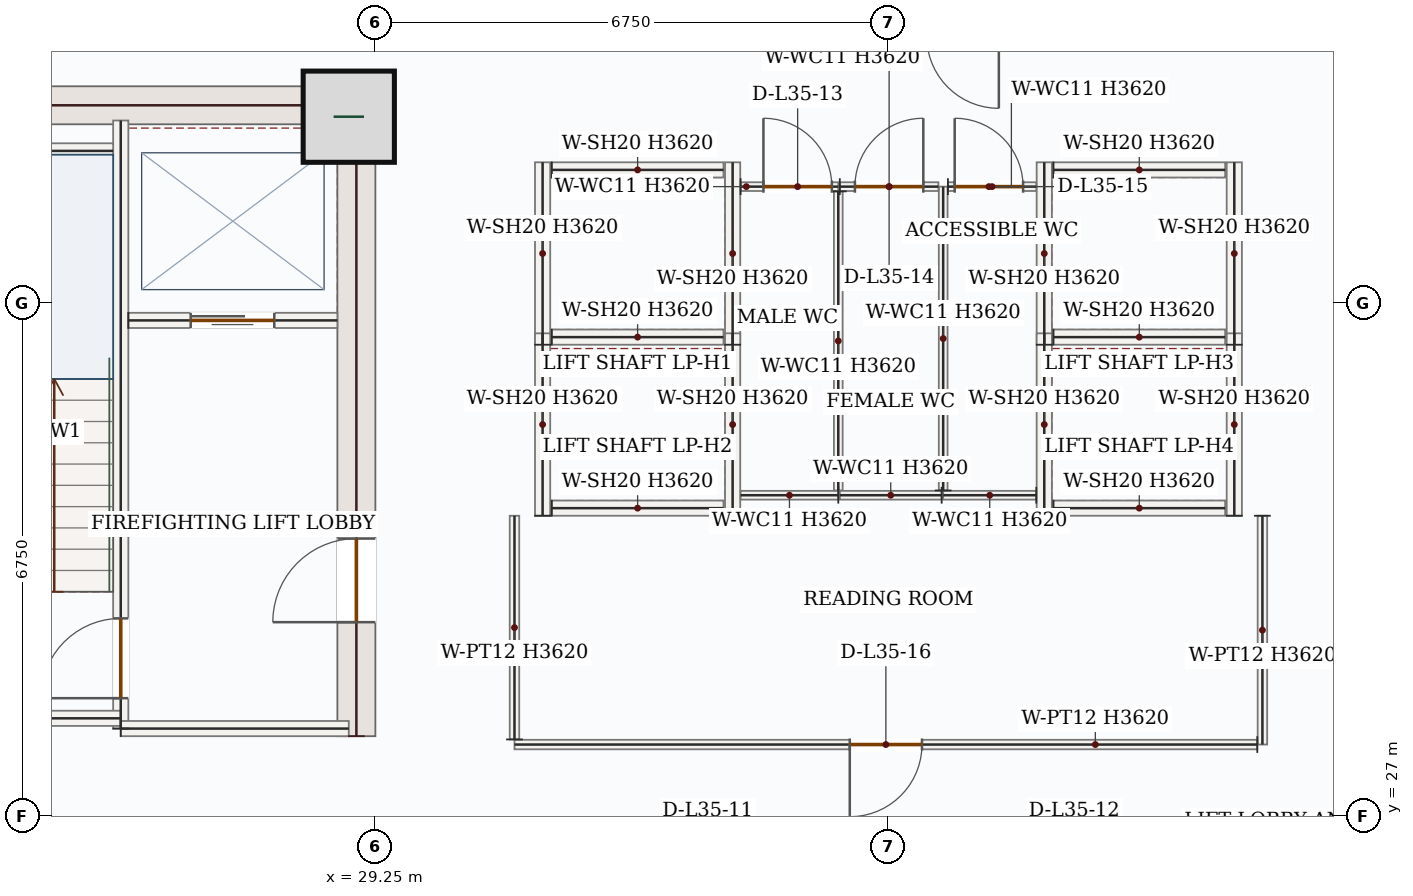
"""IFC4 building model, lengths in metres.
Left out: names, types, materials, properties, quantities, classifications, styles, units other than length and angle.
Written with IfcOpenShell. Run it as: python <this file> out.ifc"""

import sys

from ifc_helpers import new_model, si_unit, direction, frame, frame_2d, origin, origin_2d, place, context, subcontext, project, spatial, rectangle, extrude, source, transform, mapped, element, fill, save


model = new_model("IFC4")
c1 = context("Model", 3, precision=1e-05, world=origin(), true_north=direction((0.0, 1.0)))
c2 = subcontext(c1, "Body", "Model", "MODEL_VIEW")
j1 = project(units=[si_unit("LENGTHUNIT", "METRE"), si_unit("PLANEANGLEUNIT", "RADIAN")], contexts=[c1])
p1 = place(None, origin())
s1 = spatial("IfcSite", under=j1, at=p1, CompositionType="ELEMENT")
p2 = place(p1, origin())
s2 = spatial("IfcBuilding", under=s1, at=p2, CompositionType="ELEMENT")
p3 = place(p2, frame((0.0, 0.0, 155.1)))
s3 = spatial("IfcBuildingStorey", under=s2, at=p3, CompositionType="ELEMENT", Elevation=155.1)
p4 = place(p3, frame((29.0, 28.05, 0.0), z_axis=(0.0, 0.0, 1.0), x_axis=(0.0, 1.0, 0.0)))
e1 = element("IfcWall", 1, at=p4, inside=s3, PredefinedType="SHEAR", context=c2, shape_type="SweptSolid", body=[
    extrude(rectangle(XDim=8.55, YDim=0.5, at=frame_2d((4.275, 0.0))), origin(), (0.0, 0.0, 1.0), 3.62),
])
p5 = place(p4, frame((1.5, 0.0, 0.0)))
e2 = element("IfcOpeningElement", 2, at=p5, cuts=e1, PredefinedType="OPENING", context=c2, shape_type="SweptSolid", body=[
    extrude(rectangle(XDim=1.1, YDim=2.2, at=frame_2d((0.55, 1.1))), frame((0.0, 0.26, 0.0), z_axis=(0.0, -1.0, 0.0), x_axis=(1.0, 0.0, 0.0)), (0.0, 0.0, 1.0), 0.52),
])
m1 = source(origin(), c2, "Body", "SweptSolid", [
    extrude(rectangle(XDim=7.0, YDim=0.5, at=frame_2d((3.5, 0.0))), origin(), (0.0, 0.0, 1.0), 3.62),
])
p6 = place(p3, frame((21.75, 36.35, 0.0), z_axis=(0.0, 0.0, 1.0), x_axis=(1.0, 0.0, 0.0)))
e3 = element("IfcWall", 3, at=p6, inside=s3, PredefinedType="SHEAR", context=c2, shape_type="MappedRepresentation", body=[
    mapped(m1, transform((0.0, 0.0, 0.0), x_axis=(1.0, 0.0, 0.0), y_axis=(0.0, 1.0, 0.0), z_axis=(0.0, 0.0, 1.0), scale=1.0)),
])
m2 = source(origin(), c2, "Body", "SweptSolid", [
    extrude(rectangle(XDim=1.2, YDim=1.2, at=origin_2d()), origin(), (0.0, 0.0, 1.0), 3.9),
])
p7 = place(p3, frame((28.9, 36.2, 0.0), z_axis=(0.0, 0.0, 1.0), x_axis=(1.0, 0.0, 0.0)))
e4 = element("IfcColumn", 4, at=p7, inside=s3, PredefinedType="COLUMN", context=c2, shape_type="MappedRepresentation", body=[
    mapped(m2, transform((0.0, 0.0, 0.0), x_axis=(1.0, 0.0, 0.0), y_axis=(0.0, 1.0, 0.0), z_axis=(0.0, 0.0, 1.0), scale=1.0)),
])
p8 = place(p3, frame((25.9, 28.15, 0.0), z_axis=(0.0, 0.0, 1.0), x_axis=(0.0, 1.0, 0.0)))
e5 = element("IfcWall", 5, at=p8, inside=s3, PredefinedType="SOLIDWALL", context=c2, shape_type="SweptSolid", body=[
    extrude(rectangle(XDim=8.0, YDim=0.2, at=frame_2d((4.0, 0.0))), origin(), (0.0, 0.0, 1.0), 3.62),
])
p9 = place(p8, frame((0.4, 0.0, 0.0)))
e6 = element("IfcOpeningElement", 6, at=p9, cuts=e5, PredefinedType="OPENING", context=c2, shape_type="SweptSolid", body=[
    extrude(rectangle(XDim=1.05, YDim=2.15, at=frame_2d((0.525, 1.075))), frame((0.0, 0.11, 0.0), z_axis=(0.0, -1.0, 0.0), x_axis=(1.0, 0.0, 0.0)), (0.0, 0.0, 1.0), 0.22),
])
m3 = source(origin(), c2, "Body", "SweptSolid", [
    extrude(rectangle(XDim=4.25, YDim=0.2, at=frame_2d((2.125, 0.0))), origin(), (0.0, 0.0, 1.0), 3.62),
])
p10 = place(p3, frame((21.65, 28.285, 0.0), z_axis=(0.0, 0.0, 1.0), x_axis=(1.0, 0.0, 0.0)))
e7 = element("IfcWall", 7, at=p10, inside=s3, PredefinedType="SOLIDWALL", context=c2, shape_type="MappedRepresentation", body=[
    mapped(m3, transform((0.0, 0.0, 0.0), x_axis=(1.0, 0.0, 0.0), y_axis=(0.0, 1.0, 0.0), z_axis=(0.0, 0.0, 1.0), scale=1.0)),
])
m4 = source(origin(), c2, "Body", "SweptSolid", [
    extrude(rectangle(XDim=3.0, YDim=0.2, at=frame_2d((1.5, 0.0))), origin(), (0.0, 0.0, 1.0), 3.62),
])
p11 = place(p3, frame((25.9, 28.15, 0.0), z_axis=(0.0, 0.0, 1.0), x_axis=(1.0, 0.0, 0.0)))
e8 = element("IfcWall", 8, at=p11, inside=s3, PredefinedType="SOLIDWALL", context=c2, shape_type="MappedRepresentation", body=[
    mapped(m4, transform((0.0, 0.0, 0.0), x_axis=(1.0, 0.0, 0.0), y_axis=(0.0, 1.0, 0.0), z_axis=(0.0, 0.0, 1.0), scale=1.0)),
])
m5 = source(origin(), c2, "Body", "SweptSolid", [
    extrude(rectangle(XDim=3.25, YDim=0.2, at=frame_2d((1.625, 0.0))), origin(), (0.0, 0.0, 1.0), 3.62),
])
p12 = place(p3, frame((22.55, 35.75, 0.0), z_axis=(0.0, 0.0, 1.0), x_axis=(1.0, 0.0, 0.0)))
e9 = element("IfcWall", 9, at=p12, inside=s3, PredefinedType="SOLIDWALL", context=c2, shape_type="MappedRepresentation", body=[
    mapped(m5, transform((0.0, 0.0, 0.0), x_axis=(1.0, 0.0, 0.0), y_axis=(0.0, 1.0, 0.0), z_axis=(0.0, 0.0, 1.0), scale=1.0)),
])
p13 = place(p3, frame((26.0, 33.52, 0.0), z_axis=(0.0, 0.0, 1.0), x_axis=(1.0, 0.0, 0.0)))
e10 = element("IfcWall", 10, at=p13, inside=s3, PredefinedType="SOLIDWALL", context=c2, shape_type="SweptSolid", body=[
    extrude(rectangle(XDim=2.75, YDim=0.2, at=frame_2d((1.375, 0.0))), origin(), (0.0, 0.0, 1.0), 3.62),
])
p14 = place(p13, frame((0.82, 0.0, 0.0)))
e11 = element("IfcOpeningElement", 11, at=p14, cuts=e10, PredefinedType="OPENING", context=c2, shape_type="SweptSolid", body=[
    extrude(rectangle(XDim=1.1, YDim=2.15, at=frame_2d((0.55, 1.075))), frame((0.0, 0.11, 0.0), z_axis=(0.0, -1.0, 0.0), x_axis=(1.0, 0.0, 0.0)), (0.0, 0.0, 1.0), 0.22),
])
m6 = source(origin(), c2, "Body", "SweptSolid", [
    extrude(rectangle(XDim=2.4, YDim=0.2, at=frame_2d((1.2, 0.0))), origin(), (0.0, 0.0, 1.0), 3.62),
])
for number, where, z_axis, x_axis in (
    (12, (31.45, 33.2, 0.0), (0.0, 0.0, 1.0), (0.0, 1.0, 0.0)),
    (13, (33.95, 33.2, 0.0), (0.0, 0.0, 1.0), (0.0, 1.0, 0.0)),
):
    element("IfcWall", number, at=place(p3, frame(where, z_axis=z_axis, x_axis=x_axis)), inside=s3, PredefinedType="SOLIDWALL", context=c2, shape_type="MappedRepresentation", body=[
        mapped(m6, transform((0.0, 0.0, 0.0), x_axis=(1.0, 0.0, 0.0), y_axis=(0.0, 1.0, 0.0), z_axis=(0.0, 0.0, 1.0), scale=1.0)),
    ])
m7 = source(origin(), c2, "Body", "SweptSolid", [
    extrude(rectangle(XDim=2.26, YDim=0.2, at=frame_2d((1.13, 0.0))), origin(), (0.0, 0.0, 1.0), 3.62),
])
for number, where, z_axis, x_axis in (
    (14, (31.57, 33.3, 0.0), (0.0, 0.0, 1.0), (1.0, 0.0, 0.0)),
    (15, (31.57, 35.5, 0.0), (0.0, 0.0, 1.0), (1.0, 0.0, 0.0)),
):
    element("IfcWall", number, at=place(p3, frame(where, z_axis=z_axis, x_axis=x_axis)), inside=s3, PredefinedType="SOLIDWALL", context=c2, shape_type="MappedRepresentation", body=[
        mapped(m7, transform((0.0, 0.0, 0.0), x_axis=(1.0, 0.0, 0.0), y_axis=(0.0, 1.0, 0.0), z_axis=(0.0, 0.0, 1.0), scale=1.0)),
    ])
for number, where, z_axis, x_axis in (
    (16, (31.45, 30.95, 0.0), (0.0, 0.0, 1.0), (0.0, 1.0, 0.0)),
    (17, (33.95, 30.95, 0.0), (0.0, 0.0, 1.0), (0.0, 1.0, 0.0)),
):
    element("IfcWall", number, at=place(p3, frame(where, z_axis=z_axis, x_axis=x_axis)), inside=s3, PredefinedType="SOLIDWALL", context=c2, shape_type="MappedRepresentation", body=[
        mapped(m6, transform((0.0, 0.0, 0.0), x_axis=(1.0, 0.0, 0.0), y_axis=(0.0, 1.0, 0.0), z_axis=(0.0, 0.0, 1.0), scale=1.0)),
    ])
p15 = place(p3, frame((31.57, 31.05, 0.0), z_axis=(0.0, 0.0, 1.0), x_axis=(1.0, 0.0, 0.0)))
e18 = element("IfcWall", 18, at=p15, inside=s3, PredefinedType="SOLIDWALL", context=c2, shape_type="MappedRepresentation", body=[
    mapped(m7, transform((0.0, 0.0, 0.0), x_axis=(1.0, 0.0, 0.0), y_axis=(0.0, 1.0, 0.0), z_axis=(0.0, 0.0, 1.0), scale=1.0)),
])
for number, where, z_axis, x_axis in (
    (19, (38.05, 33.2, 0.0), (0.0, 0.0, 1.0), (0.0, 1.0, 0.0)),
    (20, (40.55, 33.2, 0.0), (0.0, 0.0, 1.0), (0.0, 1.0, 0.0)),
):
    element("IfcWall", number, at=place(p3, frame(where, z_axis=z_axis, x_axis=x_axis)), inside=s3, PredefinedType="SOLIDWALL", context=c2, shape_type="MappedRepresentation", body=[
        mapped(m6, transform((0.0, 0.0, 0.0), x_axis=(1.0, 0.0, 0.0), y_axis=(0.0, 1.0, 0.0), z_axis=(0.0, 0.0, 1.0), scale=1.0)),
    ])
for number, where, z_axis, x_axis in (
    (21, (38.17, 33.3, 0.0), (0.0, 0.0, 1.0), (1.0, 0.0, 0.0)),
    (22, (38.17, 35.5, 0.0), (0.0, 0.0, 1.0), (1.0, 0.0, 0.0)),
):
    element("IfcWall", number, at=place(p3, frame(where, z_axis=z_axis, x_axis=x_axis)), inside=s3, PredefinedType="SOLIDWALL", context=c2, shape_type="MappedRepresentation", body=[
        mapped(m7, transform((0.0, 0.0, 0.0), x_axis=(1.0, 0.0, 0.0), y_axis=(0.0, 1.0, 0.0), z_axis=(0.0, 0.0, 1.0), scale=1.0)),
    ])
for number, where, z_axis, x_axis in (
    (23, (38.05, 30.95, 0.0), (0.0, 0.0, 1.0), (0.0, 1.0, 0.0)),
    (24, (40.55, 30.95, 0.0), (0.0, 0.0, 1.0), (0.0, 1.0, 0.0)),
):
    element("IfcWall", number, at=place(p3, frame(where, z_axis=z_axis, x_axis=x_axis)), inside=s3, PredefinedType="SOLIDWALL", context=c2, shape_type="MappedRepresentation", body=[
        mapped(m6, transform((0.0, 0.0, 0.0), x_axis=(1.0, 0.0, 0.0), y_axis=(0.0, 1.0, 0.0), z_axis=(0.0, 0.0, 1.0), scale=1.0)),
    ])
p16 = place(p3, frame((38.17, 31.05, 0.0), z_axis=(0.0, 0.0, 1.0), x_axis=(1.0, 0.0, 0.0)))
e25 = element("IfcWall", 25, at=p16, inside=s3, PredefinedType="SOLIDWALL", context=c2, shape_type="MappedRepresentation", body=[
    mapped(m7, transform((0.0, 0.0, 0.0), x_axis=(1.0, 0.0, 0.0), y_axis=(0.0, 1.0, 0.0), z_axis=(0.0, 0.0, 1.0), scale=1.0)),
])
m8 = source(origin(), c2, "Body", "SweptSolid", [
    extrude(rectangle(XDim=1.225, YDim=0.115, at=frame_2d((0.613, 0.0))), origin(), (0.0, 0.0, 1.0), 3.62),
])
p17 = place(p3, frame((37.945, 31.22, 0.0), z_axis=(0.0, 0.0, 1.0), x_axis=(-1.0, 0.0, 0.0)))
e26 = element("IfcWall", 26, at=p17, inside=s3, PredefinedType="PARTITIONING", context=c2, shape_type="MappedRepresentation", body=[
    mapped(m8, transform((0.0, 0.0, 0.0), x_axis=(1.0, 0.0, 0.0), y_axis=(0.0, 1.0, 0.0), z_axis=(0.0, 0.0, 1.0), scale=1.0)),
])
m9 = source(origin(), c2, "Body", "SweptSolid", [
    extrude(rectangle(XDim=3.998, YDim=0.115, at=frame_2d((1.999, 0.0))), origin(), (0.0, 0.0, 1.0), 3.62),
])
p18 = place(p3, frame((36.72, 31.282, 0.0), z_axis=(0.0, 0.0, 1.0), x_axis=(0.0, 1.0, 0.0)))
e27 = element("IfcWall", 27, at=p18, inside=s3, PredefinedType="PARTITIONING", context=c2, shape_type="MappedRepresentation", body=[
    mapped(m9, transform((0.0, 0.0, 0.0), x_axis=(1.0, 0.0, 0.0), y_axis=(0.0, 1.0, 0.0), z_axis=(0.0, 0.0, 1.0), scale=1.0)),
])
p19 = place(p3, frame((36.782, 35.28, 0.0), z_axis=(0.0, 0.0, 1.0), x_axis=(1.0, 0.0, 0.0)))
e28 = element("IfcWall", 28, at=p19, inside=s3, PredefinedType="PARTITIONING", context=c2, shape_type="SweptSolid", body=[
    extrude(rectangle(XDim=1.163, YDim=0.115, at=frame_2d((0.581, 0.0))), origin(), (0.0, 0.0, 1.0), 3.62),
])
p20 = place(p19, frame((0.089, 0.0, 0.0)))
e29 = element("IfcOpeningElement", 29, at=p20, cuts=e28, PredefinedType="OPENING", context=c2, shape_type="SweptSolid", body=[
    extrude(rectangle(XDim=0.9, YDim=2.1, at=frame_2d((0.45, 1.05))), frame((0.0, 0.067, 0.0), z_axis=(0.0, -1.0, 0.0), x_axis=(1.0, 0.0, 0.0)), (0.0, 0.0, 1.0), 0.135),
])
m10 = source(origin(), c2, "Body", "SweptSolid", [
    extrude(rectangle(XDim=1.285, YDim=0.115, at=frame_2d((0.643, 0.0))), origin(), (0.0, 0.0, 1.0), 3.62),
])
p21 = place(p3, frame((35.34, 31.22, 0.0), z_axis=(0.0, 0.0, 1.0), x_axis=(-1.0, 0.0, 0.0)))
e30 = element("IfcWall", 30, at=p21, inside=s3, PredefinedType="PARTITIONING", context=c2, shape_type="MappedRepresentation", body=[
    mapped(m10, transform((0.0, 0.0, 0.0), x_axis=(1.0, 0.0, 0.0), y_axis=(0.0, 1.0, 0.0), z_axis=(0.0, 0.0, 1.0), scale=1.0)),
])
p22 = place(p3, frame((34.055, 35.28, 0.0), z_axis=(0.0, 0.0, 1.0), x_axis=(1.0, 0.0, 0.0)))
e31 = element("IfcWall", 31, at=p22, inside=s3, PredefinedType="PARTITIONING", context=c2, shape_type="SweptSolid", body=[
    extrude(rectangle(XDim=1.285, YDim=0.115, at=frame_2d((0.643, 0.0))), origin(), (0.0, 0.0, 1.0), 3.62),
])
p23 = place(p22, frame((0.3, 0.0, 0.0)))
e32 = element("IfcOpeningElement", 32, at=p23, cuts=e31, PredefinedType="OPENING", context=c2, shape_type="SweptSolid", body=[
    extrude(rectangle(XDim=0.9, YDim=2.1, at=frame_2d((0.45, 1.05))), frame((0.0, 0.067, 0.0), z_axis=(0.0, -1.0, 0.0), x_axis=(1.0, 0.0, 0.0)), (0.0, 0.0, 1.0), 0.135),
])
m11 = source(origin(), c2, "Body", "SweptSolid", [
    extrude(rectangle(XDim=3.935, YDim=0.115, at=frame_2d((1.968, 0.0))), origin(), (0.0, 0.0, 1.0), 3.62),
])
p24 = place(p3, frame((35.34, 35.218, 0.0), z_axis=(0.0, 0.0, 1.0), x_axis=(0.0, -1.0, 0.0)))
e33 = element("IfcWall", 33, at=p24, inside=s3, PredefinedType="PARTITIONING", context=c2, shape_type="MappedRepresentation", body=[
    mapped(m11, transform((0.0, 0.0, 0.0), x_axis=(1.0, 0.0, 0.0), y_axis=(0.0, 1.0, 0.0), z_axis=(0.0, 0.0, 1.0), scale=1.0)),
])
m12 = source(origin(), c2, "Body", "SweptSolid", [
    extrude(rectangle(XDim=1.34, YDim=0.115, at=frame_2d((0.67, 0.0))), origin(), (0.0, 0.0, 1.0), 3.62),
])
p25 = place(p3, frame((36.7, 31.22, 0.0), z_axis=(0.0, 0.0, 1.0), x_axis=(-1.0, 0.0, 0.0)))
e34 = element("IfcWall", 34, at=p25, inside=s3, PredefinedType="PARTITIONING", context=c2, shape_type="MappedRepresentation", body=[
    mapped(m12, transform((0.0, 0.0, 0.0), x_axis=(1.0, 0.0, 0.0), y_axis=(0.0, 1.0, 0.0), z_axis=(0.0, 0.0, 1.0), scale=1.0)),
])
p26 = place(p3, frame((35.36, 35.28, 0.0), z_axis=(0.0, 0.0, 1.0), x_axis=(1.0, 0.0, 0.0)))
e35 = element("IfcWall", 35, at=p26, inside=s3, PredefinedType="PARTITIONING", context=c2, shape_type="SweptSolid", body=[
    extrude(rectangle(XDim=1.297, YDim=0.115, at=frame_2d((0.649, 0.0))), origin(), (0.0, 0.0, 1.0), 3.62),
])
p27 = place(p26, frame((0.199, 0.0, 0.0)))
e36 = element("IfcOpeningElement", 36, at=p27, cuts=e35, PredefinedType="OPENING", context=c2, shape_type="SweptSolid", body=[
    extrude(rectangle(XDim=0.9, YDim=2.1, at=frame_2d((0.45, 1.05))), frame((0.0, 0.067, 0.0), z_axis=(0.0, -1.0, 0.0), x_axis=(1.0, 0.0, 0.0)), (0.0, 0.0, 1.0), 0.135),
])
m13 = source(origin(), c2, "Body", "SweptSolid", [
    extrude(rectangle(XDim=3.01, YDim=0.125, at=frame_2d((1.505, 0.0))), origin(), (0.0, 0.0, 1.0), 3.62),
])
p28 = place(p3, frame((40.92, 30.95, 0.0), z_axis=(0.0, 0.0, 1.0), x_axis=(0.0, -1.0, 0.0)))
e37 = element("IfcWall", 37, at=p28, inside=s3, PredefinedType="PARTITIONING", context=c2, shape_type="MappedRepresentation", body=[
    mapped(m13, transform((0.0, 0.0, 0.0), x_axis=(1.0, 0.0, 0.0), y_axis=(0.0, 1.0, 0.0), z_axis=(0.0, 0.0, 1.0), scale=1.0)),
])
p29 = place(p3, frame((40.853, 27.94, 0.0), z_axis=(0.0, 0.0, 1.0), x_axis=(-1.0, 0.0, 0.0)))
e38 = element("IfcWall", 38, at=p29, inside=s3, PredefinedType="PARTITIONING", context=c2, shape_type="SweptSolid", body=[
    extrude(rectangle(XDim=9.772, YDim=0.125, at=frame_2d((4.886, 0.0))), origin(), (0.0, 0.0, 1.0), 3.62),
])
p30 = place(p29, frame((4.411, 0.0, 0.0)))
e39 = element("IfcOpeningElement", 39, at=p30, cuts=e38, PredefinedType="OPENING", context=c2, shape_type="SweptSolid", body=[
    extrude(rectangle(XDim=0.95, YDim=2.15, at=frame_2d((0.475, 1.075))), frame((0.0, 0.073, 0.0), z_axis=(0.0, -1.0, 0.0), x_axis=(1.0, 0.0, 0.0)), (0.0, 0.0, 1.0), 0.145),
])
m14 = source(origin(), c2, "Body", "SweptSolid", [
    extrude(rectangle(XDim=2.942, YDim=0.125, at=frame_2d((1.471, 0.0))), origin(), (0.0, 0.0, 1.0), 3.62),
])
p31 = place(p3, frame((31.08, 28.008, 0.0), z_axis=(0.0, 0.0, 1.0), x_axis=(0.0, 1.0, 0.0)))
e40 = element("IfcWall", 40, at=p31, inside=s3, PredefinedType="PARTITIONING", context=c2, shape_type="MappedRepresentation", body=[
    mapped(m14, transform((0.0, 0.0, 0.0), x_axis=(1.0, 0.0, 0.0), y_axis=(0.0, 1.0, 0.0), z_axis=(0.0, 0.0, 1.0), scale=1.0)),
])
m15 = source(origin(), c2, "Body", "SweptSolid", [
    extrude(rectangle(XDim=1.05, YDim=2.15, at=frame_2d((0.525, 1.075))), frame((0.0, 0.025, 0.0), z_axis=(0.0, -1.0, 0.0), x_axis=(1.0, 0.0, 0.0)), (0.0, 0.0, 1.0), 0.05),
])
p32 = place(p9, origin())
e41 = element("IfcDoor", 41, at=p32, inside=s3, OperationType="SINGLE_SWING_LEFT", PredefinedType="DOOR", context=c2, shape_type="MappedRepresentation", body=[
    mapped(m15, transform((0.0, 0.0, 0.0), x_axis=(1.0, 0.0, 0.0), y_axis=(0.0, 1.0, 0.0), z_axis=(0.0, 0.0, 1.0), scale=1.0)),
])
fill(e6, e41)
m16 = source(origin(), c2, "Body", "SweptSolid", [
    extrude(rectangle(XDim=1.1, YDim=2.15, at=frame_2d((0.55, 1.075))), frame((0.0, 0.025, 0.0), z_axis=(0.0, -1.0, 0.0), x_axis=(1.0, 0.0, 0.0)), (0.0, 0.0, 1.0), 0.05),
])
p33 = place(p14, origin())
e42 = element("IfcDoor", 42, at=p33, inside=s3, OperationType="DOUBLE_DOOR_SLIDING", PredefinedType="DOOR", context=c2, shape_type="MappedRepresentation", body=[
    mapped(m16, transform((0.0, 0.0, 0.0), x_axis=(1.0, 0.0, 0.0), y_axis=(0.0, 1.0, 0.0), z_axis=(0.0, 0.0, 1.0), scale=1.0)),
])
fill(e11, e42)
m17 = source(origin(), c2, "Body", "SweptSolid", [
    extrude(rectangle(XDim=1.1, YDim=2.2, at=frame_2d((0.55, 1.1))), frame((0.0, 0.025, 0.0), z_axis=(0.0, -1.0, 0.0), x_axis=(1.0, 0.0, 0.0)), (0.0, 0.0, 1.0), 0.05),
])
p34 = place(p5, origin())
e43 = element("IfcDoor", 43, at=p34, inside=s3, OperationType="SINGLE_SWING_LEFT", PredefinedType="DOOR", context=c2, shape_type="MappedRepresentation", body=[
    mapped(m17, transform((0.0, 0.0, 0.0), x_axis=(1.0, 0.0, 0.0), y_axis=(0.0, 1.0, 0.0), z_axis=(0.0, 0.0, 1.0), scale=1.0)),
])
fill(e2, e43)
m18 = source(origin(), c2, "Body", "SweptSolid", [
    extrude(rectangle(XDim=0.9, YDim=2.1, at=frame_2d((0.45, 1.05))), frame((0.0, 0.025, 0.0), z_axis=(0.0, -1.0, 0.0), x_axis=(1.0, 0.0, 0.0)), (0.0, 0.0, 1.0), 0.05),
])
p35 = place(p23, origin())
e44 = element("IfcDoor", 44, at=p35, inside=s3, OperationType="SINGLE_SWING_LEFT", PredefinedType="DOOR", context=c2, shape_type="MappedRepresentation", body=[
    mapped(m18, transform((0.0, 0.0, 0.0), x_axis=(1.0, 0.0, 0.0), y_axis=(0.0, 1.0, 0.0), z_axis=(0.0, 0.0, 1.0), scale=1.0)),
])
fill(e32, e44)
p36 = place(p27, origin())
e45 = element("IfcDoor", 45, at=p36, inside=s3, OperationType="SINGLE_SWING_RIGHT", PredefinedType="DOOR", context=c2, shape_type="MappedRepresentation", body=[
    mapped(m18, transform((0.0, 0.0, 0.0), x_axis=(1.0, 0.0, 0.0), y_axis=(0.0, 1.0, 0.0), z_axis=(0.0, 0.0, 1.0), scale=1.0)),
])
fill(e36, e45)
p37 = place(p20, origin())
e46 = element("IfcDoor", 46, at=p37, inside=s3, OperationType="SINGLE_SWING_LEFT", PredefinedType="DOOR", context=c2, shape_type="MappedRepresentation", body=[
    mapped(m18, transform((0.0, 0.0, 0.0), x_axis=(1.0, 0.0, 0.0), y_axis=(0.0, 1.0, 0.0), z_axis=(0.0, 0.0, 1.0), scale=1.0)),
])
fill(e29, e46)
m19 = source(origin(), c2, "Body", "SweptSolid", [
    extrude(rectangle(XDim=0.95, YDim=2.15, at=frame_2d((0.475, 1.075))), frame((0.0, 0.025, 0.0), z_axis=(0.0, -1.0, 0.0), x_axis=(1.0, 0.0, 0.0)), (0.0, 0.0, 1.0), 0.05),
])
p38 = place(p30, origin())
e47 = element("IfcDoor", 47, at=p38, inside=s3, OperationType="SINGLE_SWING_RIGHT", PredefinedType="DOOR", context=c2, shape_type="MappedRepresentation", body=[
    mapped(m19, transform((0.0, 0.0, 0.0), x_axis=(1.0, 0.0, 0.0), y_axis=(0.0, 1.0, 0.0), z_axis=(0.0, 0.0, 1.0), scale=1.0)),
])
fill(e39, e47)
save(model, sys.argv[1])
